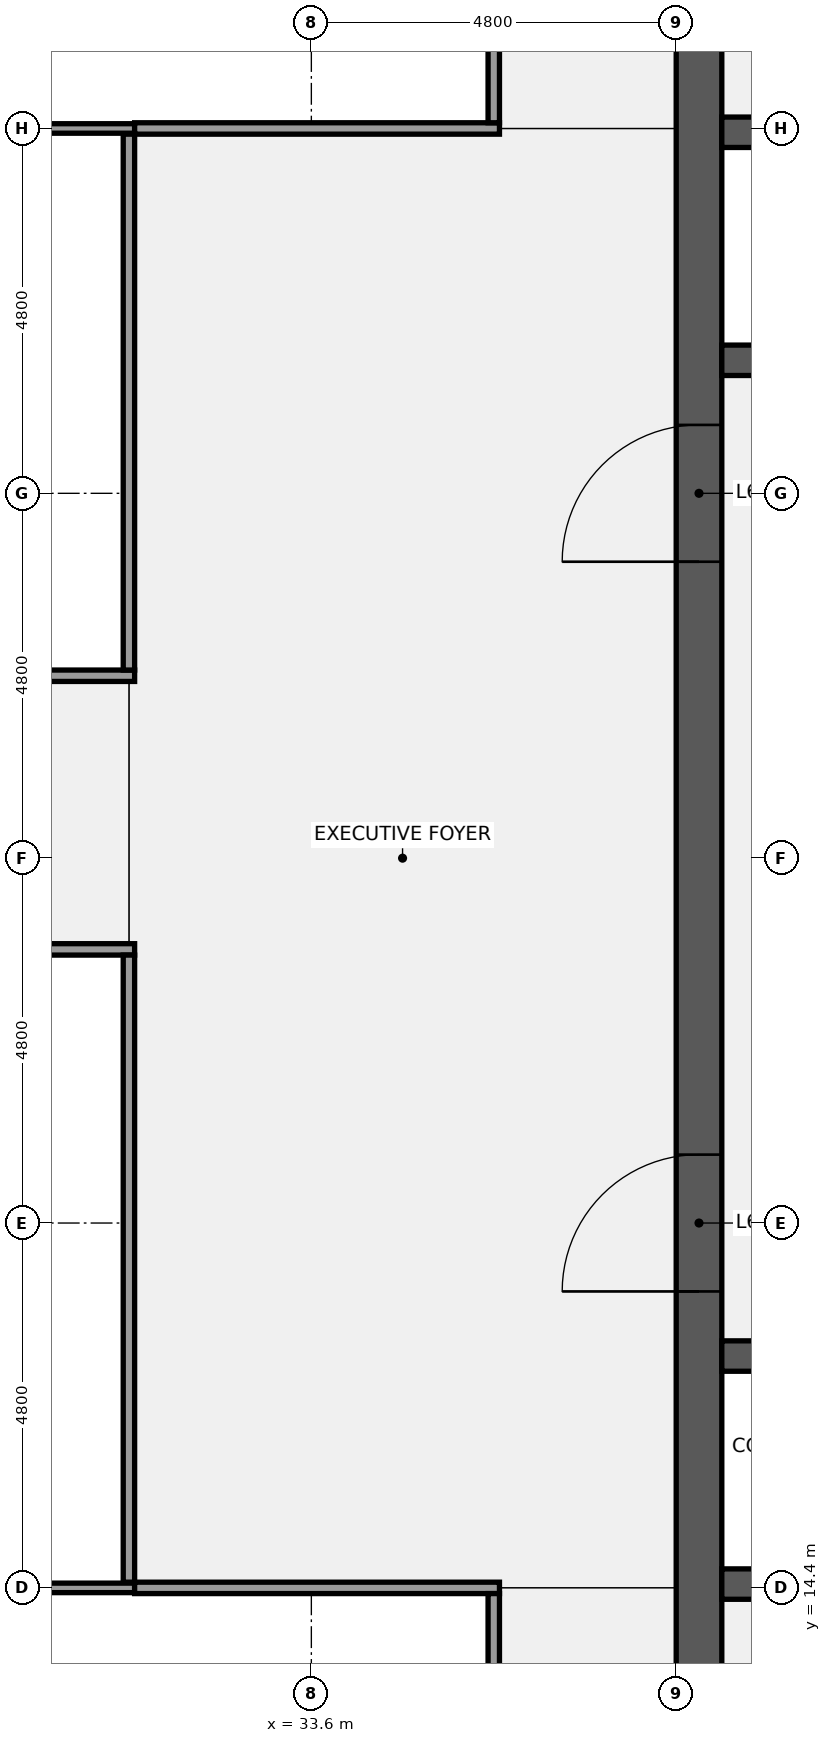
"""IFC4 building model, lengths in metres.
Left out: names, types, materials, properties, quantities, classifications, styles, units other than length and angle.
Written with IfcOpenShell. Run it as: python <this file> out.ifc"""

import sys

from ifc_helpers import new_model, si_unit, direction, frame, frame_2d, origin, place, context, subcontext, project, spatial, rectangle, extrude, element, fill, save


model = new_model("IFC4")
c1 = context("Model", 3, precision=1e-05, world=origin(), true_north=direction((0.0, 1.0)))
c2 = subcontext(c1, "Body", "Model", "MODEL_VIEW")
j1 = project(units=[si_unit("LENGTHUNIT", "METRE"), si_unit("PLANEANGLEUNIT", "RADIAN")], contexts=[c1])
p1 = place(None, origin())
s1 = spatial("IfcSite", under=j1, at=p1, CompositionType="ELEMENT")
p2 = place(p1, origin())
s2 = spatial("IfcBuilding", under=s1, at=p2, CompositionType="ELEMENT")
p3 = place(p2, frame((0.0, 0.0, 302.3)))
s3 = spatial("IfcBuildingStorey", under=s2, at=p3, CompositionType="ELEMENT", Elevation=302.3)
p4 = place(p3, frame((38.7, 9.6, 0.0), z_axis=(0.0, 0.0, 1.0), x_axis=(0.0, 1.0, 0.0)))
e1 = element("IfcWall", 1, at=p4, inside=s3, PredefinedType="SHEAR", context=c2, shape_type="SweptSolid", body=[
    extrude(rectangle(XDim=28.8, YDim=0.6, at=frame_2d((14.4, 0.0))), origin(), (0.0, 0.0, 1.0), 3.84),
])
p5 = place(p4, frame((8.7, 0.0, 0.0)))
e2 = element("IfcOpeningElement", 2, at=p5, cuts=e1, PredefinedType="OPENING", context=c2, shape_type="SweptSolid", body=[
    extrude(rectangle(XDim=1.8, YDim=2.1, at=frame_2d((0.9, 1.05))), frame((0.0, 0.31, 0.0), z_axis=(0.0, -1.0, 0.0), x_axis=(1.0, 0.0, 0.0)), (0.0, 0.0, 1.0), 0.62),
])
p6 = place(p4, frame((18.3, 0.0, 0.0)))
e3 = element("IfcOpeningElement", 3, at=p6, cuts=e1, PredefinedType="OPENING", context=c2, shape_type="SweptSolid", body=[
    extrude(rectangle(XDim=1.8, YDim=2.1, at=frame_2d((0.9, 1.05))), frame((0.0, 0.31, 0.0), z_axis=(0.0, -1.0, 0.0), x_axis=(1.0, 0.0, 0.0)), (0.0, 0.0, 1.0), 0.62),
])
p7 = place(p3, frame((39.0, 14.45, 0.0), z_axis=(0.0, 0.0, 1.0), x_axis=(1.0, 0.0, 0.0)))
e4 = element("IfcWall", 4, at=p7, inside=s3, PredefinedType="SHEAR", context=c2, shape_type="SweptSolid", body=[
    extrude(rectangle(XDim=18.0, YDim=0.4, at=frame_2d((9.0, 0.0))), origin(), (0.0, 0.0, 1.0), 3.84),
])
p8 = place(p3, frame((39.0, 17.45, 0.0), z_axis=(0.0, 0.0, 1.0), x_axis=(1.0, 0.0, 0.0)))
e5 = element("IfcWall", 5, at=p8, inside=s3, PredefinedType="SHEAR", context=c2, shape_type="SweptSolid", body=[
    extrude(rectangle(XDim=18.0, YDim=0.4, at=frame_2d((9.0, 0.0))), origin(), (0.0, 0.0, 1.0), 3.84),
])
p9 = place(p8, frame((14.837, 0.0, 0.0)))
e6 = element("IfcOpeningElement", 6, at=p9, cuts=e5, PredefinedType="OPENING", context=c2, shape_type="SweptSolid", body=[
    extrude(rectangle(XDim=1.0, YDim=2.1, at=frame_2d((0.5, 1.05))), frame((0.0, 0.21, 0.0), z_axis=(0.0, -1.0, 0.0), x_axis=(1.0, 0.0, 0.0)), (0.0, 0.0, 1.0), 0.42),
])
p10 = place(p8, frame((10.0, 0.0, 0.0)))
e7 = element("IfcOpeningElement", 7, at=p10, cuts=e5, PredefinedType="OPENING", context=c2, shape_type="SweptSolid", body=[
    extrude(rectangle(XDim=1.0, YDim=2.1, at=frame_2d((0.5, 1.05))), frame((0.0, 0.21, 0.0), z_axis=(0.0, -1.0, 0.0), x_axis=(1.0, 0.0, 0.0)), (0.0, 0.0, 1.0), 0.42),
])
p11 = place(p8, frame((5.5, 0.0, 0.0)))
e8 = element("IfcOpeningElement", 8, at=p11, cuts=e5, PredefinedType="OPENING", context=c2, shape_type="SweptSolid", body=[
    extrude(rectangle(XDim=1.0, YDim=2.1, at=frame_2d((0.5, 1.05))), frame((0.0, 0.21, 0.0), z_axis=(0.0, -1.0, 0.0), x_axis=(1.0, 0.0, 0.0)), (0.0, 0.0, 1.0), 0.42),
])
p12 = place(p8, frame((1.262, 0.0, 0.0)))
e9 = element("IfcOpeningElement", 9, at=p12, cuts=e5, PredefinedType="OPENING", context=c2, shape_type="SweptSolid", body=[
    extrude(rectangle(XDim=1.0, YDim=2.1, at=frame_2d((0.5, 1.05))), frame((0.0, 0.21, 0.0), z_axis=(0.0, -1.0, 0.0), x_axis=(1.0, 0.0, 0.0)), (0.0, 0.0, 1.0), 0.42),
])
p13 = place(p3, frame((39.0, 30.55, 0.0), z_axis=(0.0, 0.0, 1.0), x_axis=(1.0, 0.0, 0.0)))
e10 = element("IfcWall", 10, at=p13, inside=s3, PredefinedType="SHEAR", context=c2, shape_type="SweptSolid", body=[
    extrude(rectangle(XDim=18.0, YDim=0.4, at=frame_2d((9.0, 0.0))), origin(), (0.0, 0.0, 1.0), 3.84),
])
p14 = place(p13, frame((15.2, 0.0, 0.0)))
e11 = element("IfcOpeningElement", 11, at=p14, cuts=e10, PredefinedType="OPENING", context=c2, shape_type="SweptSolid", body=[
    extrude(rectangle(XDim=1.2, YDim=2.1, at=frame_2d((0.6, 1.05))), frame((0.0, 0.21, 0.0), z_axis=(0.0, -1.0, 0.0), x_axis=(1.0, 0.0, 0.0)), (0.0, 0.0, 1.0), 0.42),
])
p15 = place(p13, frame((12.6, 0.0, 0.0)))
e12 = element("IfcOpeningElement", 12, at=p15, cuts=e10, PredefinedType="OPENING", context=c2, shape_type="SweptSolid", body=[
    extrude(rectangle(XDim=1.2, YDim=2.1, at=frame_2d((0.6, 1.05))), frame((0.0, 0.21, 0.0), z_axis=(0.0, -1.0, 0.0), x_axis=(1.0, 0.0, 0.0)), (0.0, 0.0, 1.0), 0.42),
])
p16 = place(p13, frame((10.0, 0.0, 0.0)))
e13 = element("IfcOpeningElement", 13, at=p16, cuts=e10, PredefinedType="OPENING", context=c2, shape_type="SweptSolid", body=[
    extrude(rectangle(XDim=1.2, YDim=2.1, at=frame_2d((0.6, 1.05))), frame((0.0, 0.21, 0.0), z_axis=(0.0, -1.0, 0.0), x_axis=(1.0, 0.0, 0.0)), (0.0, 0.0, 1.0), 0.42),
])
p17 = place(p13, frame((6.8, 0.0, 0.0)))
e14 = element("IfcOpeningElement", 14, at=p17, cuts=e10, PredefinedType="OPENING", context=c2, shape_type="SweptSolid", body=[
    extrude(rectangle(XDim=1.2, YDim=2.1, at=frame_2d((0.6, 1.05))), frame((0.0, 0.21, 0.0), z_axis=(0.0, -1.0, 0.0), x_axis=(1.0, 0.0, 0.0)), (0.0, 0.0, 1.0), 0.42),
])
p18 = place(p13, frame((4.2, 0.0, 0.0)))
e15 = element("IfcOpeningElement", 15, at=p18, cuts=e10, PredefinedType="OPENING", context=c2, shape_type="SweptSolid", body=[
    extrude(rectangle(XDim=1.2, YDim=2.1, at=frame_2d((0.6, 1.05))), frame((0.0, 0.21, 0.0), z_axis=(0.0, -1.0, 0.0), x_axis=(1.0, 0.0, 0.0)), (0.0, 0.0, 1.0), 0.42),
])
p19 = place(p13, frame((1.6, 0.0, 0.0)))
e16 = element("IfcOpeningElement", 16, at=p19, cuts=e10, PredefinedType="OPENING", context=c2, shape_type="SweptSolid", body=[
    extrude(rectangle(XDim=1.2, YDim=2.1, at=frame_2d((0.6, 1.05))), frame((0.0, 0.21, 0.0), z_axis=(0.0, -1.0, 0.0), x_axis=(1.0, 0.0, 0.0)), (0.0, 0.0, 1.0), 0.42),
])
p20 = place(p3, frame((39.0, 33.55, 0.0), z_axis=(0.0, 0.0, 1.0), x_axis=(1.0, 0.0, 0.0)))
e17 = element("IfcWall", 17, at=p20, inside=s3, PredefinedType="SHEAR", context=c2, shape_type="SweptSolid", body=[
    extrude(rectangle(XDim=18.0, YDim=0.4, at=frame_2d((9.0, 0.0))), origin(), (0.0, 0.0, 1.0), 3.84),
])
p21 = place(p3, frame((26.475, 14.4, 0.0), z_axis=(0.0, 0.0, 1.0), x_axis=(1.0, 0.0, 0.0)))
e18 = element("IfcWall", 18, at=p21, inside=s3, PredefinedType="PARTITIONING", context=c2, shape_type="SweptSolid", body=[
    extrude(rectangle(XDim=4.8, YDim=0.125, at=frame_2d((2.4, 0.0))), origin(), (0.0, 0.0, 1.0), 2.87),
])
p22 = place(p3, frame((31.275, 14.4, 0.0), z_axis=(0.0, 0.0, 1.0), x_axis=(1.0, 0.0, 0.0)))
e19 = element("IfcWall", 19, at=p22, inside=s3, PredefinedType="PARTITIONING", context=c2, shape_type="SweptSolid", body=[
    extrude(rectangle(XDim=4.8, YDim=0.15, at=frame_2d((2.4, 0.0))), origin(), (0.0, 0.0, 1.0), 2.87),
])
for number, where, z_axis, x_axis in (
    (20, (26.325, 22.8, 0.0), (0.0, 0.0, 1.0), (1.0, 0.0, 0.0)),
    (21, (26.325, 26.4, 0.0), (0.0, 0.0, 1.0), (1.0, 0.0, 0.0)),
):
    element("IfcWall", number, at=place(p3, frame(where, z_axis=z_axis, x_axis=x_axis)), inside=s3, PredefinedType="PARTITIONING", context=c2, shape_type="SweptSolid", body=[
        extrude(rectangle(XDim=4.95, YDim=0.15, at=frame_2d((2.475, 0.0))), origin(), (0.0, 0.0, 1.0), 2.87),
    ])
p23 = place(p3, frame((26.475, 33.6, 0.0), z_axis=(0.0, 0.0, 1.0), x_axis=(1.0, 0.0, 0.0)))
e22 = element("IfcWall", 22, at=p23, inside=s3, PredefinedType="PARTITIONING", context=c2, shape_type="SweptSolid", body=[
    extrude(rectangle(XDim=4.8, YDim=0.125, at=frame_2d((2.4, 0.0))), origin(), (0.0, 0.0, 1.0), 2.87),
])
p24 = place(p3, frame((31.275, 33.6, 0.0), z_axis=(0.0, 0.0, 1.0), x_axis=(1.0, 0.0, 0.0)))
e23 = element("IfcWall", 23, at=p24, inside=s3, PredefinedType="PARTITIONING", context=c2, shape_type="SweptSolid", body=[
    extrude(rectangle(XDim=4.8, YDim=0.15, at=frame_2d((2.4, 0.0))), origin(), (0.0, 0.0, 1.0), 2.87),
])
p25 = place(p3, frame((31.2, 14.475, 0.0), z_axis=(0.0, 0.0, 1.0), x_axis=(0.0, 1.0, 0.0)))
e24 = element("IfcWall", 24, at=p25, inside=s3, PredefinedType="PARTITIONING", context=c2, shape_type="SweptSolid", body=[
    extrude(rectangle(XDim=8.25, YDim=0.15, at=frame_2d((4.125, 0.0))), origin(), (0.0, 0.0, 1.0), 2.87),
])
p26 = place(p3, frame((31.2, 26.475, 0.0), z_axis=(0.0, 0.0, 1.0), x_axis=(0.0, 1.0, 0.0)))
e25 = element("IfcWall", 25, at=p26, inside=s3, PredefinedType="PARTITIONING", context=c2, shape_type="SweptSolid", body=[
    extrude(rectangle(XDim=7.05, YDim=0.15, at=frame_2d((3.525, 0.0))), origin(), (0.0, 0.0, 1.0), 2.87),
])
for number, where, z_axis, x_axis in (
    (26, (36.0, 9.675, 0.0), (0.0, 0.0, 1.0), (0.0, 1.0, 0.0)),
    (27, (36.0, 33.675, 0.0), (0.0, 0.0, 1.0), (0.0, 1.0, 0.0)),
):
    element("IfcWall", number, at=place(p3, frame(where, z_axis=z_axis, x_axis=x_axis)), inside=s3, PredefinedType="PARTITIONING", context=c2, shape_type="SweptSolid", body=[
        extrude(rectangle(XDim=4.65, YDim=0.15, at=frame_2d((2.325, 0.0))), origin(), (0.0, 0.0, 1.0), 2.87),
    ])
p27 = place(p5, origin())
e28 = element("IfcDoor", 28, at=p27, inside=s3, OperationType="DOUBLE_DOOR_SINGLE_SWING", PredefinedType="DOOR", context=c2, shape_type="SweptSolid", body=[
    extrude(rectangle(XDim=1.8, YDim=2.1, at=frame_2d((0.9, 1.05))), frame((0.0, 0.025, 0.0), z_axis=(0.0, -1.0, 0.0), x_axis=(1.0, 0.0, 0.0)), (0.0, 0.0, 1.0), 0.05),
])
fill(e2, e28)
p28 = place(p6, origin())
e29 = element("IfcDoor", 29, at=p28, inside=s3, OperationType="DOUBLE_DOOR_SINGLE_SWING", PredefinedType="DOOR", context=c2, shape_type="SweptSolid", body=[
    extrude(rectangle(XDim=1.8, YDim=2.1, at=frame_2d((0.9, 1.05))), frame((0.0, 0.025, 0.0), z_axis=(0.0, -1.0, 0.0), x_axis=(1.0, 0.0, 0.0)), (0.0, 0.0, 1.0), 0.05),
])
fill(e3, e29)
save(model, sys.argv[1])
